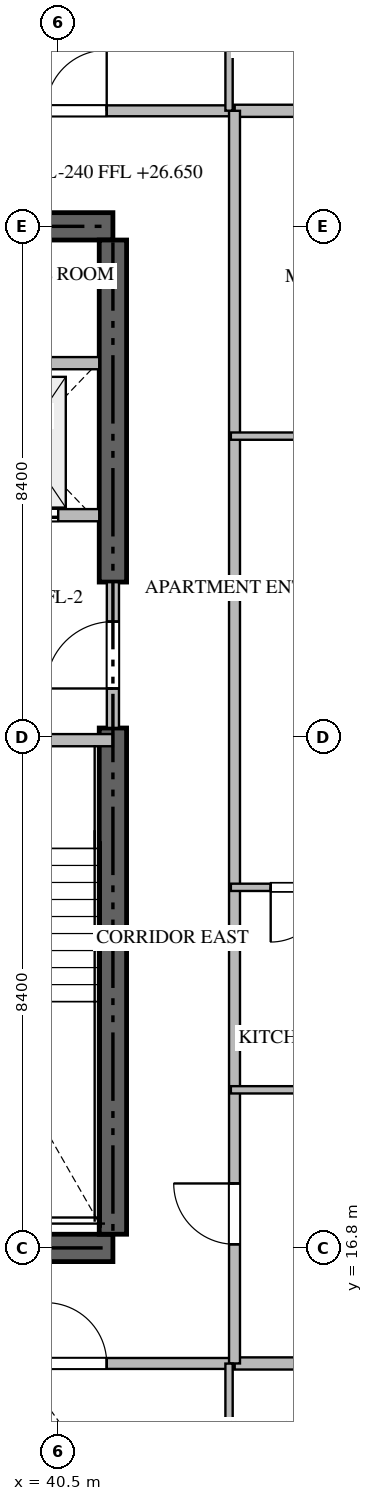
"""IFC4 building model, lengths in metres.
Left out: names, types, materials, properties, quantities, classifications, styles, units other than length and angle.
Written with IfcOpenShell. Run it as: python <this file> out.ifc"""

import sys

from ifc_helpers import new_model, si_unit, direction, frame, frame_2d, origin, place, context, subcontext, project, spatial, rectangle, extrude, source, transform, mapped, element, fill, save


model = new_model("IFC4")
c1 = context("Model", 3, precision=1e-05, world=origin(), true_north=direction((0.0, 1.0)))
c2 = subcontext(c1, "Body", "Model", "MODEL_VIEW")
j1 = project(units=[si_unit("LENGTHUNIT", "METRE"), si_unit("PLANEANGLEUNIT", "RADIAN")], contexts=[c1])
p1 = place(None, origin())
s1 = spatial("IfcSite", under=j1, at=p1, CompositionType="ELEMENT")
p2 = place(p1, origin())
s2 = spatial("IfcBuilding", under=s1, at=p2, CompositionType="ELEMENT")
p3 = place(p2, frame((0.0, 0.0, 26.7)))
s3 = spatial("IfcBuildingStorey", under=s2, at=p3, CompositionType="ELEMENT", Elevation=26.7)
for number, where, z_axis, x_axis in (
    (1, (23.4, 16.8, -0.44), (0.0, 0.0, 1.0), (1.0, 0.0, 0.0)),
    (2, (41.4, 33.6, -0.44), (0.0, 0.0, 1.0), (-1.0, 0.0, 0.0)),
):
    element("IfcWall", number, at=place(p3, frame(where, z_axis=z_axis, x_axis=x_axis)), inside=s3, PredefinedType="SHEAR", context=c2, shape_type="SweptSolid", body=[
        extrude(rectangle(XDim=18.0, YDim=0.45, at=frame_2d((9.0, 0.0))), origin(), (0.0, 0.0, 1.0), 3.928),
    ])
p4 = place(p3, frame((41.4, 17.025, -0.44), z_axis=(0.0, 0.0, 1.0), x_axis=(0.0, 1.0, 0.0)))
e3 = element("IfcWall", 3, at=p4, inside=s3, PredefinedType="SHEAR", context=c2, shape_type="SweptSolid", body=[
    extrude(rectangle(XDim=8.325, YDim=0.45, at=frame_2d((4.163, 0.0))), origin(), (0.0, 0.0, 1.0), 3.928),
])
p5 = place(p3, frame((41.4, 27.75, -0.44), z_axis=(0.0, 0.0, 1.0), x_axis=(0.0, 1.0, 0.0)))
e4 = element("IfcWall", 4, at=p5, inside=s3, PredefinedType="SHEAR", context=c2, shape_type="SweptSolid", body=[
    extrude(rectangle(XDim=5.625, YDim=0.45, at=frame_2d((2.812, 0.0))), origin(), (0.0, 0.0, 1.0), 3.928),
])
p6 = place(p3, frame((36.95, 25.15, 0.0), z_axis=(0.0, 0.0, 1.0), x_axis=(1.0, 0.0, 0.0)))
e5 = element("IfcWall", 5, at=p6, inside=s3, PredefinedType="STANDARD", context=c2, shape_type="SweptSolid", body=[
    extrude(rectangle(XDim=4.45, YDim=0.2, at=frame_2d((2.225, 0.0))), origin(), (0.0, 0.0, 1.0), 3.49),
])
p7 = place(p6, frame((1.65, 0.0, 0.0)))
e6 = element("IfcOpeningElement", 6, at=p7, cuts=e5, PredefinedType="OPENING", context=c2, shape_type="SweptSolid", body=[
    extrude(rectangle(XDim=1.1, YDim=2.15, at=frame_2d((0.55, 1.075))), frame((0.0, 0.11, 0.0), z_axis=(0.0, -1.0, 0.0), x_axis=(1.0, 0.0, 0.0)), (0.0, 0.0, 1.0), 0.22),
])
p8 = place(p3, frame((38.75, 28.85, 0.0), z_axis=(0.0, 0.0, 1.0), x_axis=(1.0, 0.0, 0.0)))
e7 = element("IfcWall", 7, at=p8, inside=s3, PredefinedType="STANDARD", context=c2, shape_type="SweptSolid", body=[
    extrude(rectangle(XDim=2.425, YDim=0.2, at=frame_2d((1.212, 0.0))), origin(), (0.0, 0.0, 1.0), 3.49),
])
p9 = place(p8, frame((0.55, 0.0, 0.0)))
e8 = element("IfcOpeningElement", 8, at=p9, cuts=e7, PredefinedType="OPENING", context=c2, shape_type="SweptSolid", body=[
    extrude(rectangle(XDim=1.2, YDim=2.2, at=frame_2d((0.6, 1.1))), frame((0.0, 0.11, 0.0), z_axis=(0.0, -1.0, 0.0), x_axis=(1.0, 0.0, 0.0)), (0.0, 0.0, 1.0), 0.22),
])
p10 = place(p3, frame((38.75, 31.35, 0.0), z_axis=(0.0, 0.0, 1.0), x_axis=(1.0, 0.0, 0.0)))
e9 = element("IfcWall", 9, at=p10, inside=s3, PredefinedType="STANDARD", context=c2, shape_type="SweptSolid", body=[
    extrude(rectangle(XDim=2.425, YDim=0.2, at=frame_2d((1.212, 0.0))), origin(), (0.0, 0.0, 1.0), 3.49),
])
p11 = place(p3, frame((41.4, 25.352, 0.0), z_axis=(0.0, 0.0, 1.0), x_axis=(0.0, 1.0, 0.0)))
e10 = element("IfcWall", 10, at=p11, inside=s3, PredefinedType="STANDARD", context=c2, shape_type="SweptSolid", body=[
    extrude(rectangle(XDim=2.396, YDim=0.2, at=frame_2d((1.198, 0.0))), origin(), (0.0, 0.0, 1.0), 3.49),
])
p12 = place(p11, frame((0.648, 0.0, 0.0)))
e11 = element("IfcOpeningElement", 11, at=p12, cuts=e10, PredefinedType="OPENING", context=c2, shape_type="SweptSolid", body=[
    extrude(rectangle(XDim=1.1, YDim=2.15, at=frame_2d((0.55, 1.075))), frame((0.0, 0.11, 0.0), z_axis=(0.0, -1.0, 0.0), x_axis=(1.0, 0.0, 0.0)), (0.0, 0.0, 1.0), 0.22),
])
for number, where, z_axis, x_axis in (
    (12, (43.4, 14.9, 0.0), (0.0, 0.0, 1.0), (1.0, 0.0, 0.0)),
    (13, (43.4, 35.5, 0.0), (0.0, 0.0, 1.0), (1.0, 0.0, 0.0)),
):
    element("IfcWall", number, at=place(p3, frame(where, z_axis=z_axis, x_axis=x_axis)), inside=s3, PredefinedType="PARTITIONING", context=c2, shape_type="SweptSolid", body=[
        extrude(rectangle(XDim=15.318, YDim=0.2, at=frame_2d((7.659, 0.0))), origin(), (0.0, 0.0, 1.0), 3.49),
    ])
p13 = place(p3, frame((21.402, 14.9, 0.0), z_axis=(0.0, 0.0, 1.0), x_axis=(1.0, 0.0, 0.0)))
e14 = element("IfcWall", 14, at=p13, inside=s3, PredefinedType="PARTITIONING", context=c2, shape_type="SweptSolid", body=[
    extrude(rectangle(XDim=21.996, YDim=0.18, at=frame_2d((10.998, 0.0))), origin(), (0.0, 0.0, 1.0), 3.49),
])
p14 = place(p13, frame((2.1, 0.0, 0.0)))
e15 = element("IfcOpeningElement", 15, at=p14, cuts=e14, PredefinedType="OPENING", context=c2, shape_type="SweptSolid", body=[
    extrude(rectangle(XDim=1.0, YDim=2.15, at=frame_2d((0.5, 1.075))), frame((0.0, 0.1, 0.0), z_axis=(0.0, -1.0, 0.0), x_axis=(1.0, 0.0, 0.0)), (0.0, 0.0, 1.0), 0.2),
])
p15 = place(p13, frame((6.719, 0.0, 0.0)))
e16 = element("IfcOpeningElement", 16, at=p15, cuts=e14, PredefinedType="OPENING", context=c2, shape_type="SweptSolid", body=[
    extrude(rectangle(XDim=1.0, YDim=2.15, at=frame_2d((0.5, 1.075))), frame((0.0, 0.1, 0.0), z_axis=(0.0, -1.0, 0.0), x_axis=(1.0, 0.0, 0.0)), (0.0, 0.0, 1.0), 0.2),
])
p16 = place(p13, frame((18.896, 0.0, 0.0)))
e17 = element("IfcOpeningElement", 17, at=p16, cuts=e14, PredefinedType="OPENING", context=c2, shape_type="SweptSolid", body=[
    extrude(rectangle(XDim=1.0, YDim=2.15, at=frame_2d((0.5, 1.075))), frame((0.0, 0.1, 0.0), z_axis=(0.0, -1.0, 0.0), x_axis=(1.0, 0.0, 0.0)), (0.0, 0.0, 1.0), 0.2),
])
p17 = place(p3, frame((21.402, 35.5, 0.0), z_axis=(0.0, 0.0, 1.0), x_axis=(1.0, 0.0, 0.0)))
e18 = element("IfcWall", 18, at=p17, inside=s3, PredefinedType="PARTITIONING", context=c2, shape_type="SweptSolid", body=[
    extrude(rectangle(XDim=21.996, YDim=0.18, at=frame_2d((10.998, 0.0))), origin(), (0.0, 0.0, 1.0), 3.49),
])
p18 = place(p17, frame((2.1, 0.0, 0.0)))
e19 = element("IfcOpeningElement", 19, at=p18, cuts=e18, PredefinedType="OPENING", context=c2, shape_type="SweptSolid", body=[
    extrude(rectangle(XDim=1.0, YDim=2.15, at=frame_2d((0.5, 1.075))), frame((0.0, 0.1, 0.0), z_axis=(0.0, -1.0, 0.0), x_axis=(1.0, 0.0, 0.0)), (0.0, 0.0, 1.0), 0.2),
])
p19 = place(p17, frame((14.277, 0.0, 0.0)))
e20 = element("IfcOpeningElement", 20, at=p19, cuts=e18, PredefinedType="OPENING", context=c2, shape_type="SweptSolid", body=[
    extrude(rectangle(XDim=1.0, YDim=2.15, at=frame_2d((0.5, 1.075))), frame((0.0, 0.1, 0.0), z_axis=(0.0, -1.0, 0.0), x_axis=(1.0, 0.0, 0.0)), (0.0, 0.0, 1.0), 0.2),
])
p20 = place(p17, frame((18.896, 0.0, 0.0)))
e21 = element("IfcOpeningElement", 21, at=p20, cuts=e18, PredefinedType="OPENING", context=c2, shape_type="SweptSolid", body=[
    extrude(rectangle(XDim=1.0, YDim=2.15, at=frame_2d((0.5, 1.075))), frame((0.0, 0.1, 0.0), z_axis=(0.0, -1.0, 0.0), x_axis=(1.0, 0.0, 0.0)), (0.0, 0.0, 1.0), 0.2),
])
p21 = place(p3, frame((43.4, 14.9, 0.0), z_axis=(0.0, 0.0, 1.0), x_axis=(0.0, 1.0, 0.0)))
e22 = element("IfcWall", 22, at=p21, inside=s3, PredefinedType="PARTITIONING", context=c2, shape_type="SweptSolid", body=[
    extrude(rectangle(XDim=20.6, YDim=0.18, at=frame_2d((10.3, 0.0))), origin(), (0.0, 0.0, 1.0), 3.49),
])
p22 = place(p21, frame((1.96, 0.0, 0.0)))
e23 = element("IfcOpeningElement", 23, at=p22, cuts=e22, PredefinedType="OPENING", context=c2, shape_type="SweptSolid", body=[
    extrude(rectangle(XDim=1.0, YDim=2.15, at=frame_2d((0.5, 1.075))), frame((0.0, 0.1, 0.0), z_axis=(0.0, -1.0, 0.0), x_axis=(1.0, 0.0, 0.0)), (0.0, 0.0, 1.0), 0.2),
])
for number, where, z_axis, x_axis in (
    (24, (43.31, 12.15, 0.0), (0.0, 0.0, 1.0), (0.0, 1.0, 0.0)),
    (25, (43.31, 38.25, 0.0), (0.0, 0.0, 1.0), (0.0, -1.0, 0.0)),
):
    element("IfcWall", number, at=place(p3, frame(where, z_axis=z_axis, x_axis=x_axis)), inside=s3, PredefinedType="PARTITIONING", context=c2, shape_type="SweptSolid", body=[
        extrude(rectangle(XDim=2.748, YDim=0.12, at=frame_2d((1.374, 0.0))), origin(), (0.0, 0.0, 1.0), 3.49),
    ])
p23 = place(p3, frame((46.15, 19.4, 0.0), z_axis=(0.0, 0.0, 1.0), x_axis=(-1.0, 0.0, 0.0)))
e26 = element("IfcWall", 26, at=p23, inside=s3, PredefinedType="PARTITIONING", context=c2, shape_type="SweptSolid", body=[
    extrude(rectangle(XDim=2.81, YDim=0.12, at=frame_2d((1.405, 0.0))), origin(), (0.0, 0.0, 1.0), 3.49),
])
p24 = place(p3, frame((45.55, 22.73, 0.0), z_axis=(0.0, 0.0, 1.0), x_axis=(-1.0, 0.0, 0.0)))
e27 = element("IfcWall", 27, at=p24, inside=s3, PredefinedType="PARTITIONING", context=c2, shape_type="SweptSolid", body=[
    extrude(rectangle(XDim=2.21, YDim=0.12, at=frame_2d((1.105, 0.0))), origin(), (0.0, 0.0, 1.0), 3.49),
])
p25 = place(p24, frame((0.655, 0.0, 0.0)))
e28 = element("IfcOpeningElement", 28, at=p25, cuts=e27, PredefinedType="OPENING", context=c2, shape_type="SweptSolid", body=[
    extrude(rectangle(XDim=0.9, YDim=2.1, at=frame_2d((0.45, 1.05))), frame((0.0, 0.07, 0.0), z_axis=(0.0, -1.0, 0.0), x_axis=(1.0, 0.0, 0.0)), (0.0, 0.0, 1.0), 0.14),
])
p26 = place(p3, frame((45.548, 30.15, 0.0), z_axis=(0.0, 0.0, 1.0), x_axis=(-1.0, 0.0, 0.0)))
e29 = element("IfcWall", 29, at=p26, inside=s3, PredefinedType="PARTITIONING", context=c2, shape_type="SweptSolid", body=[
    extrude(rectangle(XDim=2.208, YDim=0.12, at=frame_2d((1.104, 0.0))), origin(), (0.0, 0.0, 1.0), 3.49),
])
m1 = source(origin(), c2, "Body", "SweptSolid", [
    extrude(rectangle(XDim=1.2, YDim=2.2, at=frame_2d((0.6, 1.1))), frame((0.0, 0.025, 0.0), z_axis=(0.0, -1.0, 0.0), x_axis=(1.0, 0.0, 0.0)), (0.0, 0.0, 1.0), 0.05),
])
p27 = place(p9, origin())
e30 = element("IfcDoor", 30, at=p27, inside=s3, OperationType="DOUBLE_DOOR_SLIDING", PredefinedType="DOOR", context=c2, shape_type="MappedRepresentation", body=[
    mapped(m1, transform((0.0, 0.0, 0.0), scale=1.0)),
])
fill(e8, e30)
m2 = source(origin(), c2, "Body", "SweptSolid", [
    extrude(rectangle(XDim=1.1, YDim=2.15, at=frame_2d((0.55, 1.075))), frame((0.0, 0.025, 0.0), z_axis=(0.0, -1.0, 0.0), x_axis=(1.0, 0.0, 0.0)), (0.0, 0.0, 1.0), 0.05),
])
p28 = place(p12, origin())
e31 = element("IfcDoor", 31, at=p28, inside=s3, OperationType="SINGLE_SWING_LEFT", PredefinedType="DOOR", context=c2, shape_type="MappedRepresentation", body=[
    mapped(m2, transform((0.0, 0.0, 0.0), scale=1.0)),
])
fill(e11, e31)
m3 = source(origin(), c2, "Body", "SweptSolid", [
    extrude(rectangle(XDim=1.0, YDim=2.15, at=frame_2d((0.5, 1.075))), frame((0.0, 0.025, 0.0), z_axis=(0.0, -1.0, 0.0), x_axis=(1.0, 0.0, 0.0)), (0.0, 0.0, 1.0), 0.05),
])
p29 = place(p16, origin())
e32 = element("IfcDoor", 32, at=p29, inside=s3, OperationType="SINGLE_SWING_LEFT", PredefinedType="DOOR", context=c2, shape_type="MappedRepresentation", body=[
    mapped(m3, transform((0.0, 0.0, 0.0), scale=1.0)),
])
fill(e17, e32)
p30 = place(p20, origin())
e33 = element("IfcDoor", 33, at=p30, inside=s3, OperationType="SINGLE_SWING_RIGHT", PredefinedType="DOOR", context=c2, shape_type="MappedRepresentation", body=[
    mapped(m3, transform((0.0, 0.0, 0.0), scale=1.0)),
])
fill(e21, e33)
p31 = place(p22, origin())
e34 = element("IfcDoor", 34, at=p31, inside=s3, OperationType="SINGLE_SWING_RIGHT", PredefinedType="DOOR", context=c2, shape_type="MappedRepresentation", body=[
    mapped(m3, transform((0.0, 0.0, 0.0), scale=1.0)),
])
fill(e23, e34)
m4 = source(origin(), c2, "Body", "SweptSolid", [
    extrude(rectangle(XDim=0.9, YDim=2.1, at=frame_2d((0.45, 1.05))), frame((0.0, 0.025, 0.0), z_axis=(0.0, -1.0, 0.0), x_axis=(1.0, 0.0, 0.0)), (0.0, 0.0, 1.0), 0.05),
])
p32 = place(p25, origin())
e35 = element("IfcDoor", 35, at=p32, inside=s3, OperationType="SINGLE_SWING_RIGHT", PredefinedType="DOOR", context=c2, shape_type="MappedRepresentation", body=[
    mapped(m4, transform((0.0, 0.0, 0.0), scale=1.0)),
])
fill(e28, e35)
save(model, sys.argv[1])
